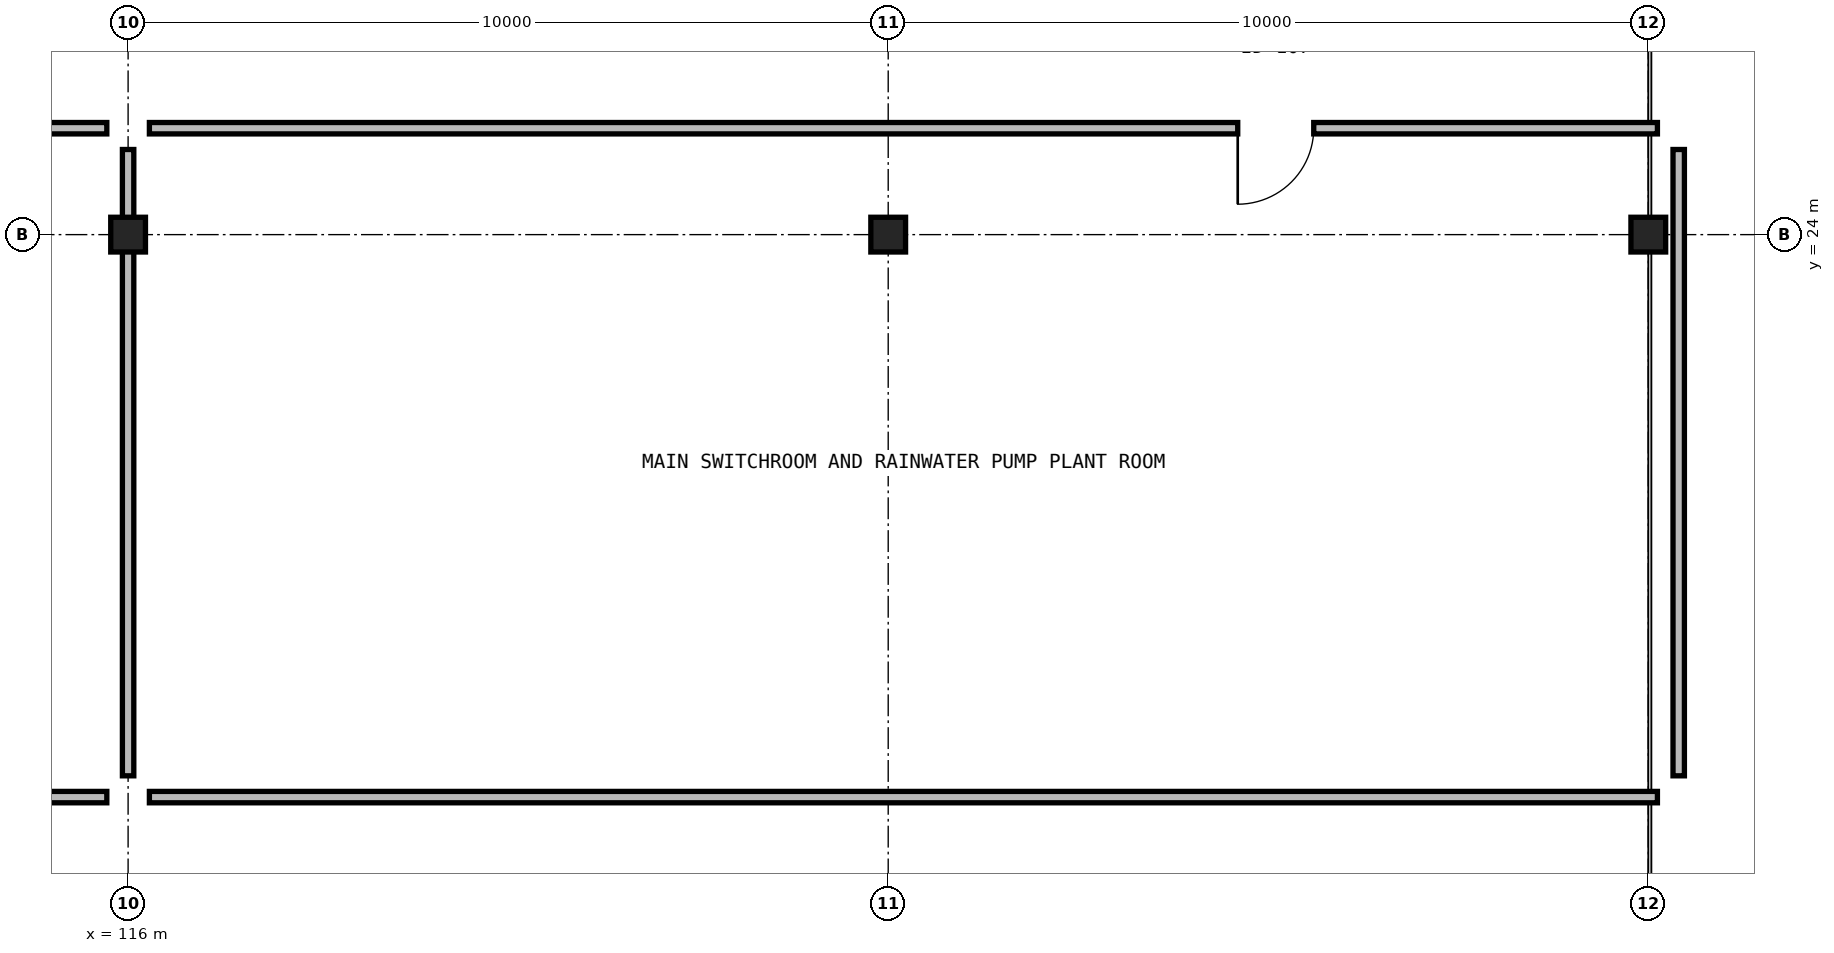
"""IFC4 building model, lengths in metres.
Left out: names, types, materials, properties, quantities, classifications, styles, units other than length and angle.
Written with IfcOpenShell. Run it as: python <this file> out.ifc"""

import sys

from ifc_helpers import new_model, si_unit, direction, frame, frame_2d, origin, origin_2d_with_axis, place, context, subcontext, project, spatial, rectangle, hollow_circle, extrude, element, fill, save


model = new_model("IFC4")
c1 = context("Model", 3, precision=1e-05, world=origin(), true_north=direction((0.0, 1.0)))
c2 = subcontext(c1, "Body", "Model", "MODEL_VIEW")
j1 = project(units=[si_unit("LENGTHUNIT", "METRE"), si_unit("PLANEANGLEUNIT", "RADIAN")], contexts=[c1])
p1 = place(None, origin())
s1 = spatial("IfcSite", under=j1, at=p1, CompositionType="ELEMENT")
p2 = place(p1, origin())
s2 = spatial("IfcBuilding", under=s1, at=p2, CompositionType="ELEMENT")
p3 = place(p2, frame((0.0, 0.0, -4.5)))
s3 = spatial("IfcBuildingStorey", under=s2, at=p3, CompositionType="ELEMENT", Elevation=-4.5)
for number, where, z_axis, x_axis in (
    (1, (116.0, 24.0, -0.45), (0.0, 0.0, 1.0), (1.0, 0.0, 0.0)),
    (2, (126.0, 24.0, -0.45), (0.0, 0.0, 1.0), (1.0, 0.0, 0.0)),
    (3, (136.0, 24.0, -0.45), (0.0, 0.0, 1.0), (1.0, 0.0, 0.0)),
):
    element("IfcColumn", number, at=place(p3, frame(where, z_axis=z_axis, x_axis=x_axis)), inside=s3, PredefinedType="COLUMN", context=c2, shape_type="SweptSolid", body=[
        extrude(hollow_circle(Radius=0.229, WallThickness=0.013, at=origin_2d_with_axis()), origin(), (0.0, 0.0, 1.0), 4.95),
    ])
p4 = place(p3, frame((95.88, 16.6, 0.0), z_axis=(0.0, 0.0, 1.0), x_axis=(1.0, 0.0, 0.0)))
e4 = element("IfcWall", 4, at=p4, inside=s3, PredefinedType="PARTITIONING", context=c2, shape_type="SweptSolid", body=[
    extrude(rectangle(XDim=19.84, YDim=0.15, at=frame_2d((9.92, 0.0), x_axis=(1.0, 0.0))), origin(), (0.0, 0.0, 1.0), 3.58),
])
p5 = place(p3, frame((116.0, 16.88, 0.0), z_axis=(0.0, 0.0, 1.0), x_axis=(0.0, 1.0, 0.0)))
e5 = element("IfcWall", 5, at=p5, inside=s3, PredefinedType="PARTITIONING", context=c2, shape_type="SweptSolid", body=[
    extrude(rectangle(XDim=8.24, YDim=0.15, at=frame_2d((4.12, 0.0), x_axis=(1.0, 0.0))), origin(), (0.0, 0.0, 1.0), 3.58),
])
p6 = place(p3, frame((115.72, 25.4, 0.0), z_axis=(0.0, 0.0, 1.0), x_axis=(-1.0, 0.0, 0.0)))
e6 = element("IfcWall", 6, at=p6, inside=s3, PredefinedType="PARTITIONING", context=c2, shape_type="SweptSolid", body=[
    extrude(rectangle(XDim=19.84, YDim=0.15, at=frame_2d((9.92, 0.0), x_axis=(1.0, 0.0))), origin(), (0.0, 0.0, 1.0), 3.58),
])
p7 = place(p6, frame((14.318, 0.0, 0.0)))
e7 = element("IfcOpeningElement", 7, at=p7, cuts=e6, PredefinedType="OPENING", context=c2, shape_type="SweptSolid", body=[
    extrude(rectangle(XDim=1.0, YDim=2.15, at=frame_2d((0.5, 1.075), x_axis=(1.0, 0.0))), frame((0.0, 0.085, 0.0), z_axis=(0.0, -1.0, 0.0), x_axis=(1.0, 0.0, 0.0)), (0.0, 0.0, 1.0), 0.17),
])
p8 = place(p3, frame((116.28, 16.6, 0.0), z_axis=(0.0, 0.0, 1.0), x_axis=(1.0, 0.0, 0.0)))
e8 = element("IfcWall", 8, at=p8, inside=s3, PredefinedType="PARTITIONING", context=c2, shape_type="SweptSolid", body=[
    extrude(rectangle(XDim=19.84, YDim=0.15, at=frame_2d((9.92, 0.0), x_axis=(1.0, 0.0))), origin(), (0.0, 0.0, 1.0), 3.58),
])
p9 = place(p3, frame((136.4, 16.88, 0.0), z_axis=(0.0, 0.0, 1.0), x_axis=(0.0, 1.0, 0.0)))
e9 = element("IfcWall", 9, at=p9, inside=s3, PredefinedType="PARTITIONING", context=c2, shape_type="SweptSolid", body=[
    extrude(rectangle(XDim=8.24, YDim=0.15, at=frame_2d((4.12, 0.0), x_axis=(1.0, 0.0))), origin(), (0.0, 0.0, 1.0), 3.58),
])
p10 = place(p3, frame((136.12, 25.4, 0.0), z_axis=(0.0, 0.0, 1.0), x_axis=(-1.0, 0.0, 0.0)))
e10 = element("IfcWall", 10, at=p10, inside=s3, PredefinedType="PARTITIONING", context=c2, shape_type="SweptSolid", body=[
    extrude(rectangle(XDim=19.84, YDim=0.15, at=frame_2d((9.92, 0.0), x_axis=(1.0, 0.0))), origin(), (0.0, 0.0, 1.0), 3.58),
])
p11 = place(p10, frame((4.521, 0.0, 0.0)))
e11 = element("IfcOpeningElement", 11, at=p11, cuts=e10, PredefinedType="OPENING", context=c2, shape_type="SweptSolid", body=[
    extrude(rectangle(XDim=1.0, YDim=2.15, at=frame_2d((0.5, 1.075), x_axis=(1.0, 0.0))), frame((0.0, 0.085, 0.0), z_axis=(0.0, -1.0, 0.0), x_axis=(1.0, 0.0, 0.0)), (0.0, 0.0, 1.0), 0.17),
])
p12 = place(p11, origin())
e12 = element("IfcDoor", 12, at=p12, inside=s3, OperationType="SINGLE_SWING_RIGHT", PredefinedType="DOOR", context=c2, shape_type="SweptSolid", body=[
    extrude(rectangle(XDim=1.0, YDim=2.15, at=frame_2d((0.5, 1.075), x_axis=(1.0, 0.0))), frame((0.0, 0.025, 0.0), z_axis=(0.0, -1.0, 0.0), x_axis=(1.0, 0.0, 0.0)), (0.0, 0.0, 1.0), 0.05),
])
fill(e11, e12)
save(model, sys.argv[1])
